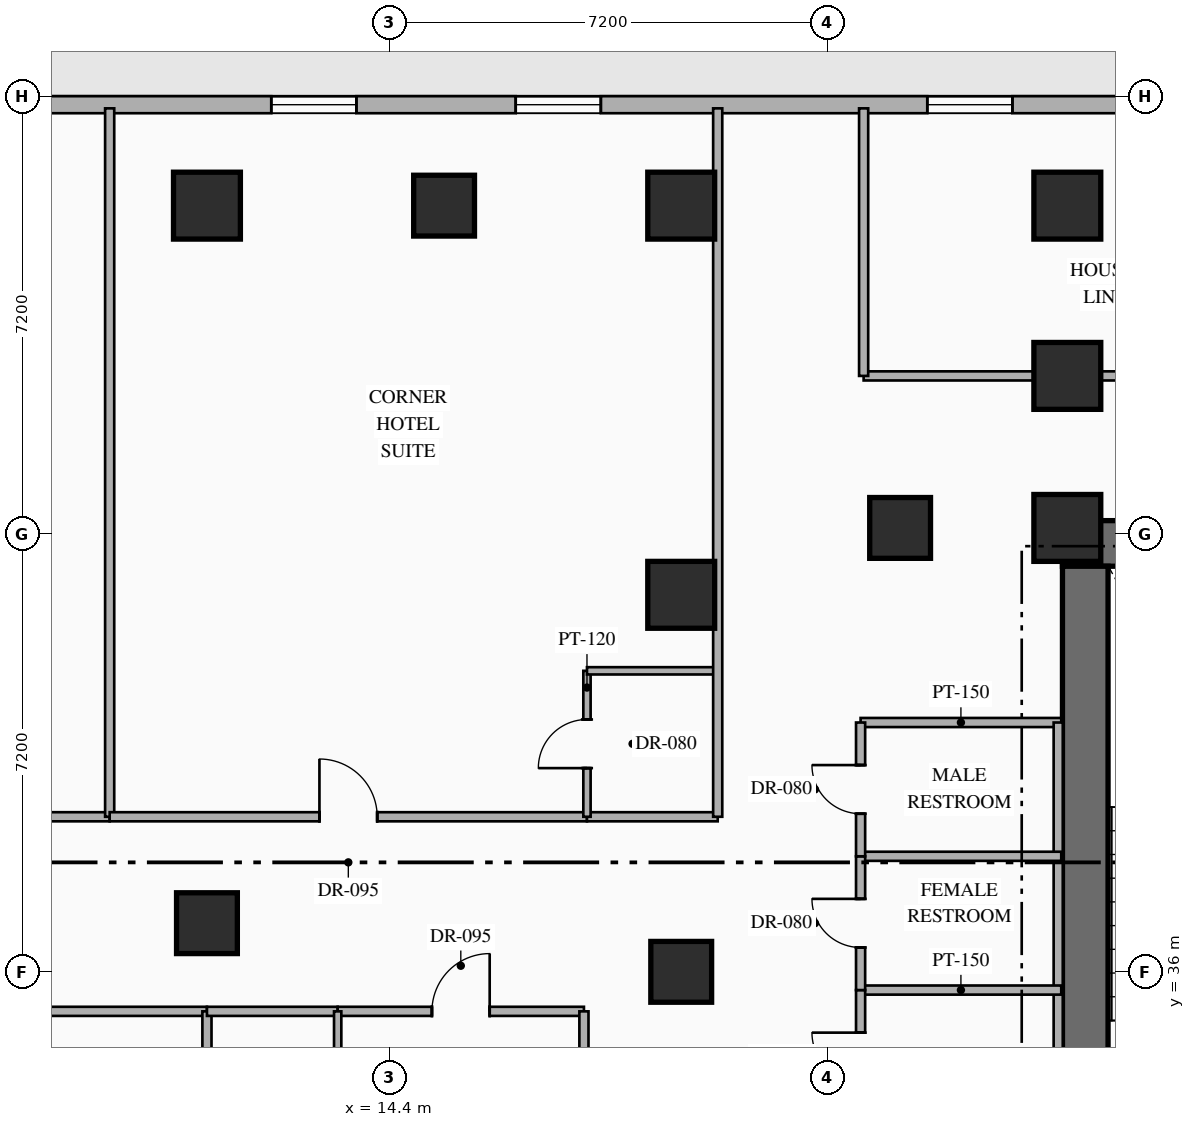
"""IFC4 building model, lengths in metres.
Left out: names, types, materials, properties, quantities, classifications, styles, units other than length and angle.
Written with IfcOpenShell. Run it as: python <this file> out.ifc"""

import sys

from ifc_helpers import new_model, si_unit, direction, frame, frame_2d, origin, origin_2d, place, context, subcontext, project, spatial, rectangle, hollow_rectangle, extrude, element, fill, save


model = new_model("IFC4")
c1 = context("Model", 3, precision=1e-05, world=origin(), true_north=direction((0.0, 1.0)))
c2 = subcontext(c1, "Body", "Model", "MODEL_VIEW")
j1 = project(units=[si_unit("LENGTHUNIT", "METRE"), si_unit("PLANEANGLEUNIT", "RADIAN")], contexts=[c1])
p1 = place(None, origin())
s1 = spatial("IfcSite", under=j1, at=p1, CompositionType="ELEMENT")
p2 = place(p1, origin())
s2 = spatial("IfcBuilding", under=s1, at=p2, CompositionType="ELEMENT")
p3 = place(p2, frame((0.0, 0.0, 39.95)))
s3 = spatial("IfcBuildingStorey", under=s2, at=p3, CompositionType="ELEMENT", Elevation=39.95)
p4 = place(p3, frame((25.47, 43.045, 0.0), z_axis=(0.0, 0.0, 1.0), x_axis=(1.0, 0.0, 0.0)))
e1 = element("IfcWall", 1, at=p4, inside=s3, PredefinedType="SHEAR", context=c2, shape_type="SweptSolid", body=[
    extrude(rectangle(XDim=8.08, YDim=0.75, at=frame_2d((4.04, 0.0))), origin(), (0.0, 0.0, 1.0), 3.35),
])
p5 = place(p3, frame((25.845, 33.19, 0.0), z_axis=(0.0, 0.0, 1.0), x_axis=(0.0, 1.0, 0.0)))
e2 = element("IfcWall", 2, at=p5, inside=s3, PredefinedType="SHEAR", context=c2, shape_type="SweptSolid", body=[
    extrude(rectangle(XDim=9.48, YDim=0.75, at=frame_2d((4.74, 0.0))), origin(), (0.0, 0.0, 1.0), 3.35),
])
p6 = place(p3, frame((25.55, 43.3, 0.0), z_axis=(0.0, 0.0, 1.0), x_axis=(1.0, 0.0, 0.0)))
e3 = element("IfcColumn", 3, at=p6, inside=s3, PredefinedType="COLUMN", context=c2, shape_type="SweptSolid", body=[
    extrude(rectangle(XDim=1.1, YDim=1.1, at=origin_2d()), origin(), (0.0, 0.0, 1.0), 3.35),
])
for number, where, z_axis, x_axis in (
    (4, (25.55, 45.8, 0.0), (0.0, 0.0, 1.0), (1.0, 0.0, 0.0)),
    (5, (11.4, 48.6, 0.0), (0.0, 0.0, 1.0), (1.0, 0.0, 0.0)),
    (6, (19.2, 48.6, 0.0), (0.0, 0.0, 1.0), (1.0, 0.0, 0.0)),
    (7, (25.55, 48.6, 0.0), (0.0, 0.0, 1.0), (1.0, 0.0, 0.0)),
    (8, (19.2, 42.2, 0.0), (0.0, 0.0, 1.0), (1.0, 0.0, 0.0)),
):
    element("IfcColumn", number, at=place(p3, frame(where, z_axis=z_axis, x_axis=x_axis)), inside=s3, PredefinedType="COLUMN", context=c2, shape_type="SweptSolid", body=[
        extrude(hollow_rectangle(XDim=1.1, YDim=1.1, WallThickness=0.04, at=origin_2d()), origin(), (0.0, 0.0, 1.0), 3.35),
    ])
for number, where, z_axis, x_axis in (
    (9, (22.8, 43.3, 0.0), (0.0, 0.0, 1.0), (1.0, 0.0, 0.0)),
    (10, (11.4, 36.8, 0.0), (0.0, 0.0, 1.0), (1.0, 0.0, 0.0)),
    (11, (19.2, 36.0, 0.0), (0.0, 0.0, 1.0), (1.0, 0.0, 0.0)),
    (12, (15.3, 48.6, 0.0), (0.0, 0.0, 1.0), (1.0, 0.0, 0.0)),
):
    element("IfcColumn", number, at=place(p3, frame(where, z_axis=z_axis, x_axis=x_axis)), inside=s3, PredefinedType="COLUMN", context=c2, shape_type="SweptSolid", body=[
        extrude(hollow_rectangle(XDim=1.0, YDim=1.0, WallThickness=0.038, at=origin_2d()), origin(), (0.0, 0.0, 1.0), 3.35),
    ])
p7 = place(p3, frame((2.458, 50.26, 0.0), z_axis=(0.0, 0.0, 1.0), x_axis=(1.0, 0.0, 0.0)))
e13 = element("IfcWall", 13, at=p7, inside=s3, PredefinedType="STANDARD", context=c2, shape_type="SweptSolid", body=[
    extrude(rectangle(XDim=40.084, YDim=0.28, at=frame_2d((20.042, 0.0))), origin(), (0.0, 0.0, 1.0), 3.13),
])
p8 = place(p7, frame((4.26, 0.0, 0.0)))
e14 = element("IfcOpeningElement", 14, at=p8, cuts=e13, PredefinedType="OPENING", context=c2, shape_type="SweptSolid", body=[
    extrude(rectangle(XDim=1.1, YDim=2.2, at=frame_2d((0.55, 1.1))), frame((0.0, 0.15, 0.0), z_axis=(0.0, -1.0, 0.0), x_axis=(1.0, 0.0, 0.0)), (0.0, 0.0, 1.0), 0.3),
])
p9 = place(p7, frame((1.717, 0.0, 0.85)))
e15 = element("IfcOpeningElement", 15, at=p9, cuts=e13, PredefinedType="OPENING", context=c2, shape_type="SweptSolid", body=[
    extrude(rectangle(XDim=1.4, YDim=1.8, at=frame_2d((0.7, 0.9))), frame((0.0, 0.15, 0.0), z_axis=(0.0, -1.0, 0.0), x_axis=(1.0, 0.0, 0.0)), (0.0, 0.0, 1.0), 0.3),
])
p10 = place(p7, frame((10.0, 0.0, 0.85)))
e16 = element("IfcOpeningElement", 16, at=p10, cuts=e13, PredefinedType="OPENING", context=c2, shape_type="SweptSolid", body=[
    extrude(rectangle(XDim=1.4, YDim=1.8, at=frame_2d((0.7, 0.9))), frame((0.0, 0.15, 0.0), z_axis=(0.0, -1.0, 0.0), x_axis=(1.0, 0.0, 0.0)), (0.0, 0.0, 1.0), 0.3),
])
p11 = place(p7, frame((14.02, 0.0, 0.85)))
e17 = element("IfcOpeningElement", 17, at=p11, cuts=e13, PredefinedType="OPENING", context=c2, shape_type="SweptSolid", body=[
    extrude(rectangle(XDim=1.4, YDim=1.8, at=frame_2d((0.7, 0.9))), frame((0.0, 0.15, 0.0), z_axis=(0.0, -1.0, 0.0), x_axis=(1.0, 0.0, 0.0)), (0.0, 0.0, 1.0), 0.3),
])
p12 = place(p7, frame((20.789, 0.0, 0.85)))
e18 = element("IfcOpeningElement", 18, at=p12, cuts=e13, PredefinedType="OPENING", context=c2, shape_type="SweptSolid", body=[
    extrude(rectangle(XDim=1.4, YDim=1.8, at=frame_2d((0.7, 0.9))), frame((0.0, 0.15, 0.0), z_axis=(0.0, -1.0, 0.0), x_axis=(1.0, 0.0, 0.0)), (0.0, 0.0, 1.0), 0.3),
])
p13 = place(p7, frame((24.664, 0.0, 0.85)))
e19 = element("IfcOpeningElement", 19, at=p13, cuts=e13, PredefinedType="OPENING", context=c2, shape_type="SweptSolid", body=[
    extrude(rectangle(XDim=1.4, YDim=1.8, at=frame_2d((0.7, 0.9))), frame((0.0, 0.15, 0.0), z_axis=(0.0, -1.0, 0.0), x_axis=(1.0, 0.0, 0.0)), (0.0, 0.0, 1.0), 0.3),
])
p14 = place(p7, frame((26.803, 0.0, 0.85)))
e20 = element("IfcOpeningElement", 20, at=p14, cuts=e13, PredefinedType="OPENING", context=c2, shape_type="SweptSolid", body=[
    extrude(rectangle(XDim=1.4, YDim=1.8, at=frame_2d((0.7, 0.9))), frame((0.0, 0.15, 0.0), z_axis=(0.0, -1.0, 0.0), x_axis=(1.0, 0.0, 0.0)), (0.0, 0.0, 1.0), 0.3),
])
p15 = place(p7, frame((32.703, 0.0, 0.85)))
e21 = element("IfcOpeningElement", 21, at=p15, cuts=e13, PredefinedType="OPENING", context=c2, shape_type="SweptSolid", body=[
    extrude(rectangle(XDim=1.4, YDim=1.8, at=frame_2d((0.7, 0.9))), frame((0.0, 0.15, 0.0), z_axis=(0.0, -1.0, 0.0), x_axis=(1.0, 0.0, 0.0)), (0.0, 0.0, 1.0), 0.3),
])
p16 = place(p7, frame((36.967, 0.0, 0.85)))
e22 = element("IfcOpeningElement", 22, at=p16, cuts=e13, PredefinedType="OPENING", context=c2, shape_type="SweptSolid", body=[
    extrude(rectangle(XDim=1.4, YDim=1.8, at=frame_2d((0.7, 0.9))), frame((0.0, 0.15, 0.0), z_axis=(0.0, -1.0, 0.0), x_axis=(1.0, 0.0, 0.0)), (0.0, 0.0, 1.0), 0.3),
])
p17 = place(p3, frame((22.15, 40.1, 0.0), z_axis=(0.0, 0.0, 1.0), x_axis=(1.0, 0.0, 0.0)))
e23 = element("IfcWall", 23, at=p17, inside=s3, PredefinedType="PARTITIONING", context=c2, shape_type="SweptSolid", body=[
    extrude(rectangle(XDim=3.3, YDim=0.15, at=frame_2d((1.65, 0.0))), origin(), (0.0, 0.0, 1.0), 3.13),
])
p18 = place(p3, frame((25.4, 33.5, 0.0), z_axis=(0.0, 0.0, 1.0), x_axis=(0.0, 1.0, 0.0)))
e24 = element("IfcWall", 24, at=p18, inside=s3, PredefinedType="PARTITIONING", context=c2, shape_type="SweptSolid", body=[
    extrude(rectangle(XDim=6.6, YDim=0.15, at=frame_2d((3.3, 0.0))), origin(), (0.0, 0.0, 1.0), 3.13),
])
for number, where, z_axis, x_axis in (
    (25, (22.15, 35.7, 0.0), (0.0, 0.0, 1.0), (1.0, 0.0, 0.0)),
    (26, (22.15, 37.9, 0.0), (0.0, 0.0, 1.0), (1.0, 0.0, 0.0)),
):
    element("IfcWall", number, at=place(p3, frame(where, z_axis=z_axis, x_axis=x_axis)), inside=s3, PredefinedType="PARTITIONING", context=c2, shape_type="SweptSolid", body=[
        extrude(rectangle(XDim=3.3, YDim=0.15, at=frame_2d((1.65, 0.0))), origin(), (0.0, 0.0, 1.0), 3.13),
    ])
p19 = place(p3, frame((22.15, 33.5, 0.0), z_axis=(0.0, 0.0, 1.0), x_axis=(0.0, 1.0, 0.0)))
e27 = element("IfcWall", 27, at=p19, inside=s3, PredefinedType="PARTITIONING", context=c2, shape_type="SweptSolid", body=[
    extrude(rectangle(XDim=2.2, YDim=0.15, at=frame_2d((1.1, 0.0))), origin(), (0.0, 0.0, 1.0), 3.13),
])
p20 = place(p19, frame((0.7, 0.0, 0.0)))
e28 = element("IfcOpeningElement", 28, at=p20, cuts=e27, PredefinedType="OPENING", context=c2, shape_type="SweptSolid", body=[
    extrude(rectangle(XDim=0.8, YDim=2.06, at=frame_2d((0.4, 1.03))), frame((0.0, 0.085, 0.0), z_axis=(0.0, -1.0, 0.0), x_axis=(1.0, 0.0, 0.0)), (0.0, 0.0, 1.0), 0.17),
])
p21 = place(p3, frame((22.15, 35.7, 0.0), z_axis=(0.0, 0.0, 1.0), x_axis=(0.0, 1.0, 0.0)))
e29 = element("IfcWall", 29, at=p21, inside=s3, PredefinedType="PARTITIONING", context=c2, shape_type="SweptSolid", body=[
    extrude(rectangle(XDim=2.2, YDim=0.15, at=frame_2d((1.1, 0.0))), origin(), (0.0, 0.0, 1.0), 3.13),
])
p22 = place(p21, frame((0.7, 0.0, 0.0)))
e30 = element("IfcOpeningElement", 30, at=p22, cuts=e29, PredefinedType="OPENING", context=c2, shape_type="SweptSolid", body=[
    extrude(rectangle(XDim=0.8, YDim=2.06, at=frame_2d((0.4, 1.03))), frame((0.0, 0.085, 0.0), z_axis=(0.0, -1.0, 0.0), x_axis=(1.0, 0.0, 0.0)), (0.0, 0.0, 1.0), 0.17),
])
p23 = place(p3, frame((22.15, 37.9, 0.0), z_axis=(0.0, 0.0, 1.0), x_axis=(0.0, 1.0, 0.0)))
e31 = element("IfcWall", 31, at=p23, inside=s3, PredefinedType="PARTITIONING", context=c2, shape_type="SweptSolid", body=[
    extrude(rectangle(XDim=2.2, YDim=0.15, at=frame_2d((1.1, 0.0))), origin(), (0.0, 0.0, 1.0), 3.13),
])
p24 = place(p23, frame((0.7, 0.0, 0.0)))
e32 = element("IfcOpeningElement", 32, at=p24, cuts=e31, PredefinedType="OPENING", context=c2, shape_type="SweptSolid", body=[
    extrude(rectangle(XDim=0.8, YDim=2.06, at=frame_2d((0.4, 1.03))), frame((0.0, 0.085, 0.0), z_axis=(0.0, -1.0, 0.0), x_axis=(1.0, 0.0, 0.0)), (0.0, 0.0, 1.0), 0.17),
])
p25 = place(p3, frame((22.2, 45.8, 0.0), z_axis=(0.0, 0.0, 1.0), x_axis=(1.0, 0.0, 0.0)))
e33 = element("IfcWall", 33, at=p25, inside=s3, PredefinedType="PARTITIONING", context=c2, shape_type="SweptSolid", body=[
    extrude(rectangle(XDim=9.2, YDim=0.15, at=frame_2d((4.6, 0.0))), origin(), (0.0, 0.0, 1.0), 2.425),
])
p26 = place(p25, frame((5.248, 0.0, 0.0)))
e34 = element("IfcOpeningElement", 34, at=p26, cuts=e33, PredefinedType="OPENING", context=c2, shape_type="SweptSolid", body=[
    extrude(rectangle(XDim=0.95, YDim=2.15, at=frame_2d((0.475, 1.075))), frame((0.0, 0.085, 0.0), z_axis=(0.0, -1.0, 0.0), x_axis=(1.0, 0.0, 0.0)), (0.0, 0.0, 1.0), 0.17),
])
p27 = place(p3, frame((22.2, 45.8, 0.0), z_axis=(0.0, 0.0, 1.0), x_axis=(0.0, 1.0, 0.0)))
e35 = element("IfcWall", 35, at=p27, inside=s3, PredefinedType="PARTITIONING", context=c2, shape_type="SweptSolid", body=[
    extrude(rectangle(XDim=4.4, YDim=0.15, at=frame_2d((2.2, 0.0))), origin(), (0.0, 0.0, 1.0), 3.13),
])
p28 = place(p3, frame((2.15, 38.55, 0.0), z_axis=(0.0, 0.0, 1.0), x_axis=(1.0, 0.0, 0.0)))
e36 = element("IfcWall", 36, at=p28, inside=s3, PredefinedType="PARTITIONING", context=c2, shape_type="SweptSolid", body=[
    extrude(rectangle(XDim=7.65, YDim=0.15, at=frame_2d((3.825, 0.0))), origin(), (0.0, 0.0, 1.0), 2.775),
])
p29 = place(p28, frame((3.35, 0.0, 0.0)))
e37 = element("IfcOpeningElement", 37, at=p29, cuts=e36, PredefinedType="OPENING", context=c2, shape_type="SweptSolid", body=[
    extrude(rectangle(XDim=0.95, YDim=2.15, at=frame_2d((0.475, 1.075))), frame((0.0, 0.085, 0.0), z_axis=(0.0, -1.0, 0.0), x_axis=(1.0, 0.0, 0.0)), (0.0, 0.0, 1.0), 0.17),
])
p30 = place(p3, frame((9.8, 38.55, 0.0), z_axis=(0.0, 0.0, 1.0), x_axis=(0.0, 1.0, 0.0)))
e38 = element("IfcWall", 38, at=p30, inside=s3, PredefinedType="PARTITIONING", context=c2, shape_type="SweptSolid", body=[
    extrude(rectangle(XDim=11.65, YDim=0.15, at=frame_2d((5.825, 0.0))), origin(), (0.0, 0.0, 1.0), 3.13),
])
p31 = place(p3, frame((9.8, 38.55, 0.0), z_axis=(0.0, 0.0, 1.0), x_axis=(1.0, 0.0, 0.0)))
e39 = element("IfcWall", 39, at=p31, inside=s3, PredefinedType="PARTITIONING", context=c2, shape_type="SweptSolid", body=[
    extrude(rectangle(XDim=7.85, YDim=0.15, at=frame_2d((3.925, 0.0))), origin(), (0.0, 0.0, 1.0), 2.775),
])
p32 = place(p31, frame((3.45, 0.0, 0.0)))
e40 = element("IfcOpeningElement", 40, at=p32, cuts=e39, PredefinedType="OPENING", context=c2, shape_type="SweptSolid", body=[
    extrude(rectangle(XDim=0.95, YDim=2.15, at=frame_2d((0.475, 1.075))), frame((0.0, 0.085, 0.0), z_axis=(0.0, -1.0, 0.0), x_axis=(1.0, 0.0, 0.0)), (0.0, 0.0, 1.0), 0.17),
])
p33 = place(p3, frame((17.65, 38.55, 0.0), z_axis=(0.0, 0.0, 1.0), x_axis=(1.0, 0.0, 0.0)))
e41 = element("IfcWall", 41, at=p33, inside=s3, PredefinedType="PARTITIONING", context=c2, shape_type="SweptSolid", body=[
    extrude(rectangle(XDim=2.15, YDim=0.15, at=frame_2d((1.075, 0.0))), origin(), (0.0, 0.0, 1.0), 2.775),
])
p34 = place(p3, frame((17.65, 38.55, 0.0), z_axis=(0.0, 0.0, 1.0), x_axis=(0.0, 1.0, 0.0)))
e42 = element("IfcWall", 42, at=p34, inside=s3, PredefinedType="PARTITIONING", context=c2, shape_type="SweptSolid", body=[
    extrude(rectangle(XDim=2.4, YDim=0.12, at=frame_2d((1.2, 0.0))), origin(), (0.0, 0.0, 1.0), 3.13),
])
p35 = place(p34, frame((0.8, 0.0, 0.0)))
e43 = element("IfcOpeningElement", 43, at=p35, cuts=e42, PredefinedType="OPENING", context=c2, shape_type="SweptSolid", body=[
    extrude(rectangle(XDim=0.8, YDim=2.06, at=frame_2d((0.4, 1.03))), frame((0.0, 0.07, 0.0), z_axis=(0.0, -1.0, 0.0), x_axis=(1.0, 0.0, 0.0)), (0.0, 0.0, 1.0), 0.14),
])
p36 = place(p3, frame((17.65, 40.95, 0.0), z_axis=(0.0, 0.0, 1.0), x_axis=(1.0, 0.0, 0.0)))
e44 = element("IfcWall", 44, at=p36, inside=s3, PredefinedType="PARTITIONING", context=c2, shape_type="SweptSolid", body=[
    extrude(rectangle(XDim=2.15, YDim=0.12, at=frame_2d((1.075, 0.0))), origin(), (0.0, 0.0, 1.0), 2.775),
])
p37 = place(p3, frame((19.8, 38.55, 0.0), z_axis=(0.0, 0.0, 1.0), x_axis=(0.0, 1.0, 0.0)))
e45 = element("IfcWall", 45, at=p37, inside=s3, PredefinedType="PARTITIONING", context=c2, shape_type="SweptSolid", body=[
    extrude(rectangle(XDim=11.65, YDim=0.15, at=frame_2d((5.825, 0.0))), origin(), (0.0, 0.0, 1.0), 3.13),
])
p38 = place(p3, frame((2.15, 35.35, 0.0), z_axis=(0.0, 0.0, 1.0), x_axis=(1.0, 0.0, 0.0)))
e46 = element("IfcWall", 46, at=p38, inside=s3, PredefinedType="PARTITIONING", context=c2, shape_type="SweptSolid", body=[
    extrude(rectangle(XDim=9.25, YDim=0.15, at=frame_2d((4.625, 0.0))), origin(), (0.0, 0.0, 1.0), 3.13),
])
p39 = place(p38, frame((4.15, 0.0, 0.0)))
e47 = element("IfcOpeningElement", 47, at=p39, cuts=e46, PredefinedType="OPENING", context=c2, shape_type="SweptSolid", body=[
    extrude(rectangle(XDim=0.95, YDim=2.15, at=frame_2d((0.475, 1.075))), frame((0.0, 0.085, 0.0), z_axis=(0.0, -1.0, 0.0), x_axis=(1.0, 0.0, 0.0)), (0.0, 0.0, 1.0), 0.17),
])
p40 = place(p3, frame((11.4, 23.6, 0.0), z_axis=(0.0, 0.0, 1.0), x_axis=(0.0, 1.0, 0.0)))
e48 = element("IfcWall", 48, at=p40, inside=s3, PredefinedType="PARTITIONING", context=c2, shape_type="SweptSolid", body=[
    extrude(rectangle(XDim=11.75, YDim=0.15, at=frame_2d((5.875, 0.0))), origin(), (0.0, 0.0, 1.0), 2.425),
])
p41 = place(p3, frame((11.4, 35.35, 0.0), z_axis=(0.0, 0.0, 1.0), x_axis=(1.0, 0.0, 0.0)))
e49 = element("IfcWall", 49, at=p41, inside=s3, PredefinedType="PARTITIONING", context=c2, shape_type="SweptSolid", body=[
    extrude(rectangle(XDim=2.15, YDim=0.15, at=frame_2d((1.075, 0.0))), origin(), (0.0, 0.0, 1.0), 3.13),
])
p42 = place(p3, frame((13.55, 35.35, 0.0), z_axis=(0.0, 0.0, 1.0), x_axis=(1.0, 0.0, 0.0)))
e50 = element("IfcWall", 50, at=p42, inside=s3, PredefinedType="PARTITIONING", context=c2, shape_type="SweptSolid", body=[
    extrude(rectangle(XDim=4.05, YDim=0.15, at=frame_2d((2.025, 0.0))), origin(), (0.0, 0.0, 1.0), 3.13),
])
p43 = place(p42, frame((1.55, 0.0, 0.0)))
e51 = element("IfcOpeningElement", 51, at=p43, cuts=e50, PredefinedType="OPENING", context=c2, shape_type="SweptSolid", body=[
    extrude(rectangle(XDim=0.95, YDim=2.15, at=frame_2d((0.475, 1.075))), frame((0.0, 0.085, 0.0), z_axis=(0.0, -1.0, 0.0), x_axis=(1.0, 0.0, 0.0)), (0.0, 0.0, 1.0), 0.17),
])
p44 = place(p3, frame((13.55, 32.95, 0.0), z_axis=(0.0, 0.0, 1.0), x_axis=(0.0, 1.0, 0.0)))
e52 = element("IfcWall", 52, at=p44, inside=s3, PredefinedType="PARTITIONING", context=c2, shape_type="SweptSolid", body=[
    extrude(rectangle(XDim=2.4, YDim=0.12, at=frame_2d((1.2, 0.0))), origin(), (0.0, 0.0, 1.0), 3.13),
])
p45 = place(p44, frame((0.8, 0.0, 0.0)))
e53 = element("IfcOpeningElement", 53, at=p45, cuts=e52, PredefinedType="OPENING", context=c2, shape_type="SweptSolid", body=[
    extrude(rectangle(XDim=0.8, YDim=2.06, at=frame_2d((0.4, 1.03))), frame((0.0, 0.07, 0.0), z_axis=(0.0, -1.0, 0.0), x_axis=(1.0, 0.0, 0.0)), (0.0, 0.0, 1.0), 0.14),
])
p46 = place(p3, frame((17.6, 23.6, 0.0), z_axis=(0.0, 0.0, 1.0), x_axis=(0.0, 1.0, 0.0)))
e54 = element("IfcWall", 54, at=p46, inside=s3, PredefinedType="PARTITIONING", context=c2, shape_type="SweptSolid", body=[
    extrude(rectangle(XDim=11.75, YDim=0.15, at=frame_2d((5.875, 0.0))), origin(), (0.0, 0.0, 1.0), 3.13),
])
p47 = place(p10, origin())
e55 = element("IfcWindow", 55, at=p47, inside=s3, PartitioningType="SINGLE_PANEL", PredefinedType="WINDOW", context=c2, shape_type="SweptSolid", body=[
    extrude(rectangle(XDim=1.4, YDim=1.8, at=frame_2d((0.7, 0.9))), frame((0.0, 0.03, 0.0), z_axis=(0.0, -1.0, 0.0), x_axis=(1.0, 0.0, 0.0)), (0.0, 0.0, 1.0), 0.06),
])
fill(e16, e55)
p48 = place(p11, origin())
e56 = element("IfcWindow", 56, at=p48, inside=s3, PartitioningType="SINGLE_PANEL", PredefinedType="WINDOW", context=c2, shape_type="SweptSolid", body=[
    extrude(rectangle(XDim=1.4, YDim=1.8, at=frame_2d((0.7, 0.9))), frame((0.0, 0.03, 0.0), z_axis=(0.0, -1.0, 0.0), x_axis=(1.0, 0.0, 0.0)), (0.0, 0.0, 1.0), 0.06),
])
fill(e17, e56)
p49 = place(p12, origin())
e57 = element("IfcWindow", 57, at=p49, inside=s3, PartitioningType="SINGLE_PANEL", PredefinedType="WINDOW", context=c2, shape_type="SweptSolid", body=[
    extrude(rectangle(XDim=1.4, YDim=1.8, at=frame_2d((0.7, 0.9))), frame((0.0, 0.03, 0.0), z_axis=(0.0, -1.0, 0.0), x_axis=(1.0, 0.0, 0.0)), (0.0, 0.0, 1.0), 0.06),
])
fill(e18, e57)
p50 = place(p20, origin())
e58 = element("IfcDoor", 58, at=p50, inside=s3, OperationType="SINGLE_SWING_RIGHT", PredefinedType="DOOR", context=c2, shape_type="SweptSolid", body=[
    extrude(rectangle(XDim=0.8, YDim=2.06, at=frame_2d((0.4, 1.03))), frame((0.0, 0.025, 0.0), z_axis=(0.0, -1.0, 0.0), x_axis=(1.0, 0.0, 0.0)), (0.0, 0.0, 1.0), 0.05),
])
fill(e28, e58)
p51 = place(p22, origin())
e59 = element("IfcDoor", 59, at=p51, inside=s3, OperationType="SINGLE_SWING_RIGHT", PredefinedType="DOOR", context=c2, shape_type="SweptSolid", body=[
    extrude(rectangle(XDim=0.8, YDim=2.06, at=frame_2d((0.4, 1.03))), frame((0.0, 0.025, 0.0), z_axis=(0.0, -1.0, 0.0), x_axis=(1.0, 0.0, 0.0)), (0.0, 0.0, 1.0), 0.05),
])
fill(e30, e59)
p52 = place(p24, origin())
e60 = element("IfcDoor", 60, at=p52, inside=s3, OperationType="SINGLE_SWING_RIGHT", PredefinedType="DOOR", context=c2, shape_type="SweptSolid", body=[
    extrude(rectangle(XDim=0.8, YDim=2.06, at=frame_2d((0.4, 1.03))), frame((0.0, 0.025, 0.0), z_axis=(0.0, -1.0, 0.0), x_axis=(1.0, 0.0, 0.0)), (0.0, 0.0, 1.0), 0.05),
])
fill(e32, e60)
p53 = place(p32, origin())
e61 = element("IfcDoor", 61, at=p53, inside=s3, OperationType="SINGLE_SWING_LEFT", PredefinedType="DOOR", context=c2, shape_type="SweptSolid", body=[
    extrude(rectangle(XDim=0.95, YDim=2.15, at=frame_2d((0.475, 1.075))), frame((0.0, 0.025, 0.0), z_axis=(0.0, -1.0, 0.0), x_axis=(1.0, 0.0, 0.0)), (0.0, 0.0, 1.0), 0.05),
])
fill(e40, e61)
p54 = place(p35, origin())
e62 = element("IfcDoor", 62, at=p54, inside=s3, OperationType="SINGLE_SWING_LEFT", PredefinedType="DOOR", context=c2, shape_type="SweptSolid", body=[
    extrude(rectangle(XDim=0.8, YDim=2.06, at=frame_2d((0.4, 1.03))), frame((0.0, 0.025, 0.0), z_axis=(0.0, -1.0, 0.0), x_axis=(1.0, 0.0, 0.0)), (0.0, 0.0, 1.0), 0.05),
])
fill(e43, e62)
p55 = place(p43, origin())
e63 = element("IfcDoor", 63, at=p55, inside=s3, OperationType="SINGLE_SWING_RIGHT", PredefinedType="DOOR", context=c2, shape_type="SweptSolid", body=[
    extrude(rectangle(XDim=0.95, YDim=2.15, at=frame_2d((0.475, 1.075))), frame((0.0, 0.025, 0.0), z_axis=(0.0, -1.0, 0.0), x_axis=(1.0, 0.0, 0.0)), (0.0, 0.0, 1.0), 0.05),
])
fill(e51, e63)
save(model, sys.argv[1])
